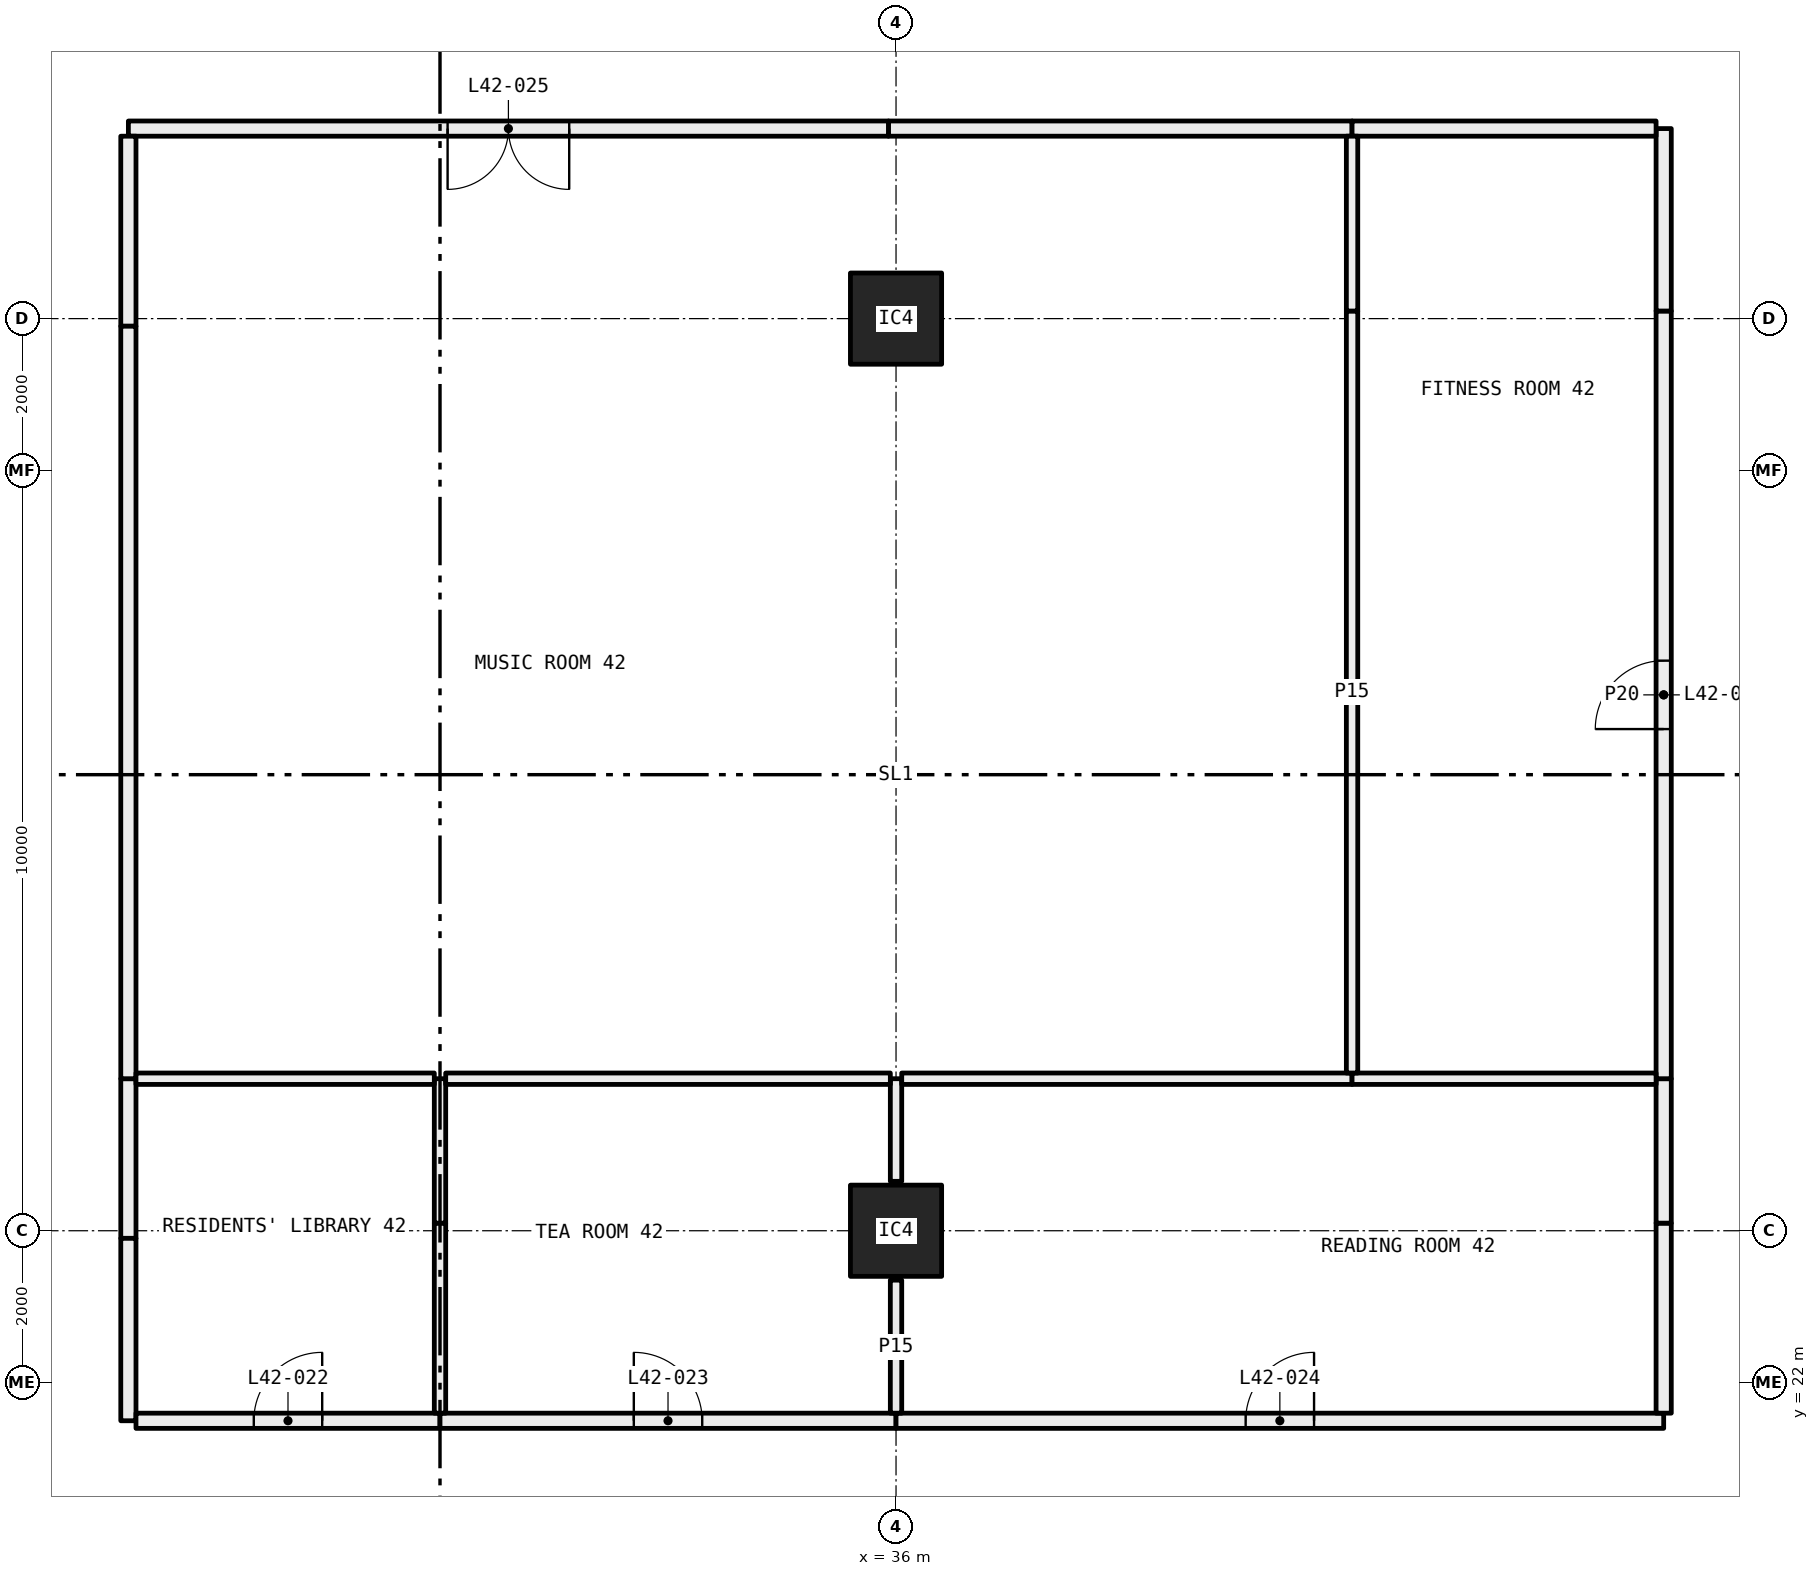
"""IFC4 building model, lengths in metres.
Left out: names, types, materials, properties, quantities, classifications, styles, units other than length and angle.
Written with IfcOpenShell. Run it as: python <this file> out.ifc"""

import sys

from ifc_helpers import new_model, si_unit, direction, frame, frame_2d, origin, origin_2d, place, context, subcontext, project, spatial, rectangle, hollow_rectangle, extrude, element, fill, save


model = new_model("IFC4")
c1 = context("Model", 3, precision=1e-05, world=origin(), true_north=direction((0.0, 1.0)))
c2 = subcontext(c1, "Body", "Model", "MODEL_VIEW")
j1 = project(units=[si_unit("LENGTHUNIT", "METRE"), si_unit("PLANEANGLEUNIT", "RADIAN")], contexts=[c1])
p1 = place(None, origin())
s1 = spatial("IfcSite", under=j1, at=p1, CompositionType="ELEMENT")
p2 = place(p1, origin())
s2 = spatial("IfcBuilding", under=s1, at=p2, CompositionType="ELEMENT")
p3 = place(p2, frame((0.0, 0.0, 161.7)))
s3 = spatial("IfcBuildingStorey", under=s2, at=p3, CompositionType="ELEMENT", Elevation=161.7)
for number, where, z_axis, x_axis in (
    (1, (36.0, 24.0, 0.0), (0.0, 0.0, 1.0), (1.0, 0.0, 0.0)),
    (2, (36.0, 36.0, 0.0), (0.0, 0.0, 1.0), (1.0, 0.0, 0.0)),
):
    element("IfcColumn", number, at=place(p3, frame(where, z_axis=z_axis, x_axis=x_axis)), inside=s3, PredefinedType="COLUMN", context=c2, shape_type="SweptSolid", body=[
        extrude(hollow_rectangle(XDim=1.2, YDim=1.2, WallThickness=0.05, at=origin_2d()), origin(), (0.0, 0.0, 1.0), 3.05),
    ])
p4 = place(p3, frame((25.9, 26.0, 0.0), z_axis=(0.0, 0.0, 1.0), x_axis=(0.0, -1.0, 0.0)))
e3 = element("IfcWall", 3, at=p4, inside=s3, PredefinedType="PARTITIONING", context=c2, shape_type="SweptSolid", body=[
    extrude(rectangle(XDim=2.1, YDim=0.2, at=frame_2d((1.05, 0.0))), origin(), (0.0, 0.0, 1.0), 2.45),
])
p5 = place(p3, frame((25.9, 23.9, 0.0), z_axis=(0.0, 0.0, 1.0), x_axis=(0.0, -1.0, 0.0)))
e4 = element("IfcWall", 4, at=p5, inside=s3, PredefinedType="PARTITIONING", context=c2, shape_type="SweptSolid", body=[
    extrude(rectangle(XDim=2.4, YDim=0.2, at=frame_2d((1.2, 0.0))), origin(), (0.0, 0.0, 1.0), 3.05),
])
p6 = place(p3, frame((26.0, 21.5, 0.0), z_axis=(0.0, 0.0, 1.0), x_axis=(1.0, 0.0, 0.0)))
e5 = element("IfcWall", 5, at=p6, inside=s3, PredefinedType="PARTITIONING", context=c2, shape_type="SweptSolid", body=[
    extrude(rectangle(XDim=4.0, YDim=0.2, at=frame_2d((2.0, 0.0))), origin(), (0.0, 0.0, 1.0), 3.05),
])
p7 = place(p6, frame((1.55, 0.0, 0.0)))
e6 = element("IfcOpeningElement", 6, at=p7, cuts=e5, PredefinedType="OPENING", context=c2, shape_type="SweptSolid", body=[
    extrude(rectangle(XDim=0.9, YDim=2.1, at=frame_2d((0.45, 1.05))), frame((0.0, 0.11, 0.0), z_axis=(0.0, -1.0, 0.0), x_axis=(1.0, 0.0, 0.0)), (0.0, 0.0, 1.0), 0.22),
])
p8 = place(p3, frame((30.0, 21.5, 0.0), z_axis=(0.0, 0.0, 1.0), x_axis=(1.0, 0.0, 0.0)))
e7 = element("IfcWall", 7, at=p8, inside=s3, PredefinedType="PARTITIONING", context=c2, shape_type="SweptSolid", body=[
    extrude(rectangle(XDim=6.0, YDim=0.2, at=frame_2d((3.0, 0.0))), origin(), (0.0, 0.0, 1.0), 2.45),
])
p9 = place(p8, frame((2.55, 0.0, 0.0)))
e8 = element("IfcOpeningElement", 8, at=p9, cuts=e7, PredefinedType="OPENING", context=c2, shape_type="SweptSolid", body=[
    extrude(rectangle(XDim=0.9, YDim=2.1, at=frame_2d((0.45, 1.05))), frame((0.0, 0.11, 0.0), z_axis=(0.0, -1.0, 0.0), x_axis=(1.0, 0.0, 0.0)), (0.0, 0.0, 1.0), 0.22),
])
p10 = place(p3, frame((36.0, 21.5, 0.0), z_axis=(0.0, 0.0, 1.0), x_axis=(1.0, 0.0, 0.0)))
e9 = element("IfcWall", 9, at=p10, inside=s3, PredefinedType="PARTITIONING", context=c2, shape_type="SweptSolid", body=[
    extrude(rectangle(XDim=10.1, YDim=0.2, at=frame_2d((5.05, 0.0))), origin(), (0.0, 0.0, 1.0), 2.45),
])
p11 = place(p10, frame((4.6, 0.0, 0.0)))
e10 = element("IfcOpeningElement", 10, at=p11, cuts=e9, PredefinedType="OPENING", context=c2, shape_type="SweptSolid", body=[
    extrude(rectangle(XDim=0.9, YDim=2.1, at=frame_2d((0.45, 1.05))), frame((0.0, 0.11, 0.0), z_axis=(0.0, -1.0, 0.0), x_axis=(1.0, 0.0, 0.0)), (0.0, 0.0, 1.0), 0.22),
])
p12 = place(p3, frame((46.1, 21.6, 0.0), z_axis=(0.0, 0.0, 1.0), x_axis=(0.0, 1.0, 0.0)))
e11 = element("IfcWall", 11, at=p12, inside=s3, PredefinedType="PARTITIONING", context=c2, shape_type="SweptSolid", body=[
    extrude(rectangle(XDim=2.5, YDim=0.2, at=frame_2d((1.25, 0.0))), origin(), (0.0, 0.0, 1.0), 2.45),
])
p13 = place(p3, frame((46.1, 24.1, 0.0), z_axis=(0.0, 0.0, 1.0), x_axis=(0.0, 1.0, 0.0)))
e12 = element("IfcWall", 12, at=p13, inside=s3, PredefinedType="PARTITIONING", context=c2, shape_type="SweptSolid", body=[
    extrude(rectangle(XDim=1.9, YDim=0.2, at=frame_2d((0.95, 0.0))), origin(), (0.0, 0.0, 1.0), 3.05),
])
p14 = place(p3, frame((42.0, 38.5, 0.0), z_axis=(0.0, 0.0, 1.0), x_axis=(-1.0, 0.0, 0.0)))
e13 = element("IfcWall", 13, at=p14, inside=s3, PredefinedType="PARTITIONING", context=c2, shape_type="SweptSolid", body=[
    extrude(rectangle(XDim=6.1, YDim=0.2, at=frame_2d((3.05, 0.0))), origin(), (0.0, 0.0, 1.0), 2.45),
])
p15 = place(p3, frame((35.9, 38.5, 0.0), z_axis=(0.0, 0.0, 1.0), x_axis=(-1.0, 0.0, 0.0)))
e14 = element("IfcWall", 14, at=p15, inside=s3, PredefinedType="PARTITIONING", context=c2, shape_type="SweptSolid", body=[
    extrude(rectangle(XDim=10.0, YDim=0.2, at=frame_2d((5.0, 0.0))), origin(), (0.0, 0.0, 1.0), 3.05),
])
p16 = place(p15, frame((4.2, 0.0, 0.0)))
e15 = element("IfcOpeningElement", 15, at=p16, cuts=e14, PredefinedType="OPENING", context=c2, shape_type="SweptSolid", body=[
    extrude(rectangle(XDim=1.6, YDim=2.1, at=frame_2d((0.8, 1.05))), frame((0.0, 0.11, 0.0), z_axis=(0.0, -1.0, 0.0), x_axis=(1.0, 0.0, 0.0)), (0.0, 0.0, 1.0), 0.22),
])
p17 = place(p3, frame((25.9, 38.4, 0.0), z_axis=(0.0, 0.0, 1.0), x_axis=(0.0, -1.0, 0.0)))
e16 = element("IfcWall", 16, at=p17, inside=s3, PredefinedType="PARTITIONING", context=c2, shape_type="SweptSolid", body=[
    extrude(rectangle(XDim=2.5, YDim=0.2, at=frame_2d((1.25, 0.0))), origin(), (0.0, 0.0, 1.0), 2.45),
])
p18 = place(p3, frame((25.9, 35.9, 0.0), z_axis=(0.0, 0.0, 1.0), x_axis=(0.0, -1.0, 0.0)))
e17 = element("IfcWall", 17, at=p18, inside=s3, PredefinedType="PARTITIONING", context=c2, shape_type="SweptSolid", body=[
    extrude(rectangle(XDim=9.9, YDim=0.2, at=frame_2d((4.95, 0.0))), origin(), (0.0, 0.0, 1.0), 3.05),
])
p19 = place(p3, frame((46.1, 26.0, 0.0), z_axis=(0.0, 0.0, 1.0), x_axis=(0.0, 1.0, 0.0)))
e18 = element("IfcWall", 18, at=p19, inside=s3, PredefinedType="PARTITIONING", context=c2, shape_type="SweptSolid", body=[
    extrude(rectangle(XDim=10.1, YDim=0.2, at=frame_2d((5.05, 0.0))), origin(), (0.0, 0.0, 1.0), 2.45),
])
p20 = place(p19, frame((4.6, 0.0, 0.0)))
e19 = element("IfcOpeningElement", 19, at=p20, cuts=e18, PredefinedType="OPENING", context=c2, shape_type="SweptSolid", body=[
    extrude(rectangle(XDim=0.9, YDim=2.1, at=frame_2d((0.45, 1.05))), frame((0.0, 0.11, 0.0), z_axis=(0.0, -1.0, 0.0), x_axis=(1.0, 0.0, 0.0)), (0.0, 0.0, 1.0), 0.22),
])
p21 = place(p3, frame((46.1, 36.1, 0.0), z_axis=(0.0, 0.0, 1.0), x_axis=(0.0, 1.0, 0.0)))
e20 = element("IfcWall", 20, at=p21, inside=s3, PredefinedType="PARTITIONING", context=c2, shape_type="SweptSolid", body=[
    extrude(rectangle(XDim=2.4, YDim=0.2, at=frame_2d((1.2, 0.0))), origin(), (0.0, 0.0, 1.0), 3.05),
])
p22 = place(p3, frame((46.0, 38.5, 0.0), z_axis=(0.0, 0.0, 1.0), x_axis=(-1.0, 0.0, 0.0)))
e21 = element("IfcWall", 21, at=p22, inside=s3, PredefinedType="PARTITIONING", context=c2, shape_type="SweptSolid", body=[
    extrude(rectangle(XDim=4.0, YDim=0.2, at=frame_2d((2.0, 0.0))), origin(), (0.0, 0.0, 1.0), 3.05),
])
p23 = place(p3, frame((30.0, 21.6, 0.0), z_axis=(0.0, 0.0, 1.0), x_axis=(0.0, 1.0, 0.0)))
e22 = element("IfcWall", 22, at=p23, inside=s3, PredefinedType="PARTITIONING", context=c2, shape_type="SweptSolid", body=[
    extrude(rectangle(XDim=2.5, YDim=0.15, at=frame_2d((1.25, 0.0))), origin(), (0.0, 0.0, 1.0), 2.45),
])
p24 = place(p3, frame((30.0, 24.1, 0.0), z_axis=(0.0, 0.0, 1.0), x_axis=(0.0, 1.0, 0.0)))
e23 = element("IfcWall", 23, at=p24, inside=s3, PredefinedType="PARTITIONING", context=c2, shape_type="SweptSolid", body=[
    extrude(rectangle(XDim=1.9, YDim=0.15, at=frame_2d((0.95, 0.0))), origin(), (0.0, 0.0, 1.0), 3.05),
])
p25 = place(p3, frame((29.925, 26.0, 0.0), z_axis=(0.0, 0.0, 1.0), x_axis=(-1.0, 0.0, 0.0)))
e24 = element("IfcWall", 24, at=p25, inside=s3, PredefinedType="PARTITIONING", context=c2, shape_type="SweptSolid", body=[
    extrude(rectangle(XDim=3.925, YDim=0.15, at=frame_2d((1.962, 0.0))), origin(), (0.0, 0.0, 1.0), 3.05),
])
p26 = place(p3, frame((36.0, 21.6, 0.0), z_axis=(0.0, 0.0, 1.0), x_axis=(0.0, 1.0, 0.0)))
e25 = element("IfcWall", 25, at=p26, inside=s3, PredefinedType="PARTITIONING", context=c2, shape_type="SweptSolid", body=[
    extrude(rectangle(XDim=1.75, YDim=0.15, at=frame_2d((0.875, 0.0))), origin(), (0.0, 0.0, 1.0), 2.45),
])
p27 = place(p3, frame((36.0, 24.65, 0.0), z_axis=(0.0, 0.0, 1.0), x_axis=(0.0, 1.0, 0.0)))
e26 = element("IfcWall", 26, at=p27, inside=s3, PredefinedType="PARTITIONING", context=c2, shape_type="SweptSolid", body=[
    extrude(rectangle(XDim=1.35, YDim=0.15, at=frame_2d((0.675, 0.0))), origin(), (0.0, 0.0, 1.0), 2.45),
])
p28 = place(p3, frame((35.925, 26.0, 0.0), z_axis=(0.0, 0.0, 1.0), x_axis=(-1.0, 0.0, 0.0)))
e27 = element("IfcWall", 27, at=p28, inside=s3, PredefinedType="PARTITIONING", context=c2, shape_type="SweptSolid", body=[
    extrude(rectangle(XDim=5.85, YDim=0.15, at=frame_2d((2.925, 0.0))), origin(), (0.0, 0.0, 1.0), 2.45),
])
p29 = place(p3, frame((42.0, 26.0, 0.0), z_axis=(0.0, 0.0, 1.0), x_axis=(-1.0, 0.0, 0.0)))
e28 = element("IfcWall", 28, at=p29, inside=s3, PredefinedType="PARTITIONING", context=c2, shape_type="SweptSolid", body=[
    extrude(rectangle(XDim=5.925, YDim=0.15, at=frame_2d((2.962, 0.0))), origin(), (0.0, 0.0, 1.0), 2.45),
])
p30 = place(p3, frame((46.0, 26.0, 0.0), z_axis=(0.0, 0.0, 1.0), x_axis=(-1.0, 0.0, 0.0)))
e29 = element("IfcWall", 29, at=p30, inside=s3, PredefinedType="PARTITIONING", context=c2, shape_type="SweptSolid", body=[
    extrude(rectangle(XDim=4.0, YDim=0.15, at=frame_2d((2.0, 0.0))), origin(), (0.0, 0.0, 1.0), 3.05),
])
p31 = place(p3, frame((42.0, 26.075, 0.0), z_axis=(0.0, 0.0, 1.0), x_axis=(0.0, 1.0, 0.0)))
e30 = element("IfcWall", 30, at=p31, inside=s3, PredefinedType="PARTITIONING", context=c2, shape_type="SweptSolid", body=[
    extrude(rectangle(XDim=10.025, YDim=0.15, at=frame_2d((5.013, 0.0))), origin(), (0.0, 0.0, 1.0), 2.45),
])
p32 = place(p3, frame((42.0, 36.1, 0.0), z_axis=(0.0, 0.0, 1.0), x_axis=(0.0, 1.0, 0.0)))
e31 = element("IfcWall", 31, at=p32, inside=s3, PredefinedType="PARTITIONING", context=c2, shape_type="SweptSolid", body=[
    extrude(rectangle(XDim=2.3, YDim=0.15, at=frame_2d((1.15, 0.0))), origin(), (0.0, 0.0, 1.0), 3.05),
])
p33 = place(p7, origin())
e32 = element("IfcDoor", 32, at=p33, inside=s3, OperationType="SINGLE_SWING_LEFT", PredefinedType="DOOR", context=c2, shape_type="SweptSolid", body=[
    extrude(rectangle(XDim=0.9, YDim=2.1, at=frame_2d((0.45, 1.05))), frame((0.0, 0.025, 0.0), z_axis=(0.0, -1.0, 0.0), x_axis=(1.0, 0.0, 0.0)), (0.0, 0.0, 1.0), 0.05),
])
fill(e6, e32)
p34 = place(p9, origin())
e33 = element("IfcDoor", 33, at=p34, inside=s3, OperationType="SINGLE_SWING_RIGHT", PredefinedType="DOOR", context=c2, shape_type="SweptSolid", body=[
    extrude(rectangle(XDim=0.9, YDim=2.1, at=frame_2d((0.45, 1.05))), frame((0.0, 0.025, 0.0), z_axis=(0.0, -1.0, 0.0), x_axis=(1.0, 0.0, 0.0)), (0.0, 0.0, 1.0), 0.05),
])
fill(e8, e33)
p35 = place(p11, origin())
e34 = element("IfcDoor", 34, at=p35, inside=s3, OperationType="SINGLE_SWING_LEFT", PredefinedType="DOOR", context=c2, shape_type="SweptSolid", body=[
    extrude(rectangle(XDim=0.9, YDim=2.1, at=frame_2d((0.45, 1.05))), frame((0.0, 0.025, 0.0), z_axis=(0.0, -1.0, 0.0), x_axis=(1.0, 0.0, 0.0)), (0.0, 0.0, 1.0), 0.05),
])
fill(e10, e34)
p36 = place(p16, origin())
e35 = element("IfcDoor", 35, at=p36, inside=s3, OperationType="DOUBLE_DOOR_SINGLE_SWING", PredefinedType="DOOR", context=c2, shape_type="SweptSolid", body=[
    extrude(rectangle(XDim=1.6, YDim=2.1, at=frame_2d((0.8, 1.05))), frame((0.0, 0.025, 0.0), z_axis=(0.0, -1.0, 0.0), x_axis=(1.0, 0.0, 0.0)), (0.0, 0.0, 1.0), 0.05),
])
fill(e15, e35)
p37 = place(p20, origin())
e36 = element("IfcDoor", 36, at=p37, inside=s3, OperationType="SINGLE_SWING_RIGHT", PredefinedType="DOOR", context=c2, shape_type="SweptSolid", body=[
    extrude(rectangle(XDim=0.9, YDim=2.1, at=frame_2d((0.45, 1.05))), frame((0.0, 0.025, 0.0), z_axis=(0.0, -1.0, 0.0), x_axis=(1.0, 0.0, 0.0)), (0.0, 0.0, 1.0), 0.05),
])
fill(e19, e36)
save(model, sys.argv[1])
